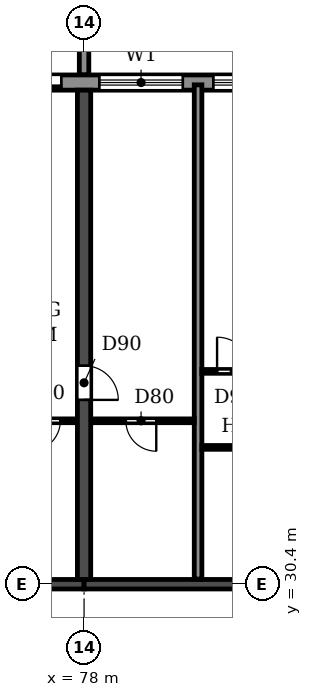
"""IFC4 building model, lengths in metres.
Left out: names, types, materials, properties, quantities, classifications, styles, units other than length and angle.
Written with IfcOpenShell. Run it as: python <this file> out.ifc"""

import sys

from ifc_helpers import new_model, si_unit, direction, frame, frame_2d, origin, place, context, subcontext, project, spatial, polyline, rectangle, outline, extrude, source, transform, mapped, element, fill, save


model = new_model("IFC4")
c1 = context("Model", 3, precision=1e-05, world=origin(), true_north=direction((0.0, 1.0)))
c2 = subcontext(c1, "Body", "Model", "MODEL_VIEW")
j1 = project(units=[si_unit("LENGTHUNIT", "METRE"), si_unit("PLANEANGLEUNIT", "RADIAN")], contexts=[c1])
p1 = place(None, origin())
s1 = spatial("IfcSite", under=j1, at=p1, CompositionType="ELEMENT")
p2 = place(p1, origin())
s2 = spatial("IfcBuilding", under=s1, at=p2, CompositionType="ELEMENT")
p3 = place(p2, frame((0.0, 0.0, 82.8)))
s3 = spatial("IfcBuildingStorey", under=s2, at=p3, CompositionType="ELEMENT", Elevation=82.8)
p4 = place(p3, frame((78.0, 30.525, 0.0), z_axis=(0.0, 0.0, 1.0), x_axis=(0.0, 1.0, 0.0)))
e1 = element("IfcWall", 1, at=p4, inside=s3, PredefinedType="SHEAR", context=c2, shape_type="SweptSolid", body=[
    extrude(rectangle(XDim=12.875, YDim=0.35, at=frame_2d((6.438, 0.0))), origin(), (0.0, 0.0, 1.0), 3.06),
])
p5 = place(p4, frame((4.725, 0.0, 0.0)))
e2 = element("IfcOpeningElement", 2, at=p5, cuts=e1, PredefinedType="OPENING", context=c2, shape_type="SweptSolid", body=[
    extrude(rectangle(XDim=0.9, YDim=2.1, at=frame_2d((0.45, 1.05))), frame((0.0, 0.185, 0.0), z_axis=(0.0, -1.0, 0.0), x_axis=(1.0, 0.0, 0.0)), (0.0, 0.0, 1.0), 0.37),
])
p6 = place(p3, frame((72.0, 30.4, 0.0), z_axis=(0.0, 0.0, 1.0), x_axis=(1.0, 0.0, 0.0)))
e3 = element("IfcWall", 3, at=p6, inside=s3, PredefinedType="SHEAR", context=c2, shape_type="SweptSolid", body=[
    extrude(rectangle(XDim=6.0, YDim=0.25, at=frame_2d((3.0, 0.0))), origin(), (0.0, 0.0, 1.0), 2.46),
])
p7 = place(p6, frame((2.55, 0.0, 0.0)))
e4 = element("IfcOpeningElement", 4, at=p7, cuts=e3, PredefinedType="OPENING", context=c2, shape_type="SweptSolid", body=[
    extrude(rectangle(XDim=1.0, YDim=2.1, at=frame_2d((0.5, 1.05))), frame((0.0, 0.135, 0.0), z_axis=(0.0, -1.0, 0.0), x_axis=(1.0, 0.0, 0.0)), (0.0, 0.0, 1.0), 0.27),
])
p8 = place(p3, frame((78.0, 30.4, 0.0), z_axis=(0.0, 0.0, 1.0), x_axis=(1.0, 0.0, 0.0)))
e5 = element("IfcWall", 5, at=p8, inside=s3, PredefinedType="SHEAR", context=c2, shape_type="SweptSolid", body=[
    extrude(rectangle(XDim=6.0, YDim=0.25, at=frame_2d((3.0, 0.0))), origin(), (0.0, 0.0, 1.0), 2.46),
])
p9 = place(p3, frame((91.317, 43.6, 0.0), z_axis=(0.0, 0.0, 1.0), x_axis=(-1.0, 0.0, 0.0)))
e6 = element("IfcWall", 6, at=p9, inside=s3, PredefinedType="STANDARD", context=c2, shape_type="SweptSolid", body=[
    extrude(rectangle(XDim=80.634, YDim=0.4, at=frame_2d((40.317, 0.0))), origin(), (0.0, 0.0, 1.0), 3.06),
])
p10 = place(p9, frame((76.717, 0.0, 0.9)))
e7 = element("IfcOpeningElement", 7, at=p10, cuts=e6, PredefinedType="OPENING", context=c2, shape_type="SweptSolid", body=[
    extrude(rectangle(XDim=2.2, YDim=1.5, at=frame_2d((1.1, 0.75))), frame((0.0, 0.21, 0.0), z_axis=(0.0, -1.0, 0.0), x_axis=(1.0, 0.0, 0.0)), (0.0, 0.0, 1.0), 0.42),
])
p11 = place(p9, frame((73.917, 0.0, 0.0)))
e8 = element("IfcOpeningElement", 8, at=p11, cuts=e6, PredefinedType="OPENING", context=c2, shape_type="SweptSolid", body=[
    extrude(rectangle(XDim=1.8, YDim=2.4, at=frame_2d((0.9, 1.2))), frame((0.0, 0.21, 0.0), z_axis=(0.0, -1.0, 0.0), x_axis=(1.0, 0.0, 0.0)), (0.0, 0.0, 1.0), 0.42),
])
p12 = place(p9, frame((70.717, 0.0, 0.9)))
e9 = element("IfcOpeningElement", 9, at=p12, cuts=e6, PredefinedType="OPENING", context=c2, shape_type="SweptSolid", body=[
    extrude(rectangle(XDim=2.2, YDim=1.5, at=frame_2d((1.1, 0.75))), frame((0.0, 0.21, 0.0), z_axis=(0.0, -1.0, 0.0), x_axis=(1.0, 0.0, 0.0)), (0.0, 0.0, 1.0), 0.42),
])
p13 = place(p9, frame((67.717, 0.0, 0.9)))
e10 = element("IfcOpeningElement", 10, at=p13, cuts=e6, PredefinedType="OPENING", context=c2, shape_type="SweptSolid", body=[
    extrude(rectangle(XDim=2.2, YDim=1.5, at=frame_2d((1.1, 0.75))), frame((0.0, 0.21, 0.0), z_axis=(0.0, -1.0, 0.0), x_axis=(1.0, 0.0, 0.0)), (0.0, 0.0, 1.0), 0.42),
])
p14 = place(p9, frame((64.717, 0.0, 0.9)))
e11 = element("IfcOpeningElement", 11, at=p14, cuts=e6, PredefinedType="OPENING", context=c2, shape_type="SweptSolid", body=[
    extrude(rectangle(XDim=2.2, YDim=1.5, at=frame_2d((1.1, 0.75))), frame((0.0, 0.21, 0.0), z_axis=(0.0, -1.0, 0.0), x_axis=(1.0, 0.0, 0.0)), (0.0, 0.0, 1.0), 0.42),
])
p15 = place(p9, frame((61.917, 0.0, 0.0)))
e12 = element("IfcOpeningElement", 12, at=p15, cuts=e6, PredefinedType="OPENING", context=c2, shape_type="SweptSolid", body=[
    extrude(rectangle(XDim=1.8, YDim=2.4, at=frame_2d((0.9, 1.2))), frame((0.0, 0.21, 0.0), z_axis=(0.0, -1.0, 0.0), x_axis=(1.0, 0.0, 0.0)), (0.0, 0.0, 1.0), 0.42),
])
p16 = place(p9, frame((58.917, 0.0, 0.0)))
e13 = element("IfcOpeningElement", 13, at=p16, cuts=e6, PredefinedType="OPENING", context=c2, shape_type="SweptSolid", body=[
    extrude(rectangle(XDim=1.8, YDim=2.4, at=frame_2d((0.9, 1.2))), frame((0.0, 0.21, 0.0), z_axis=(0.0, -1.0, 0.0), x_axis=(1.0, 0.0, 0.0)), (0.0, 0.0, 1.0), 0.42),
])
p17 = place(p9, frame((55.717, 0.0, 0.9)))
e14 = element("IfcOpeningElement", 14, at=p17, cuts=e6, PredefinedType="OPENING", context=c2, shape_type="SweptSolid", body=[
    extrude(rectangle(XDim=2.2, YDim=1.5, at=frame_2d((1.1, 0.75))), frame((0.0, 0.21, 0.0), z_axis=(0.0, -1.0, 0.0), x_axis=(1.0, 0.0, 0.0)), (0.0, 0.0, 1.0), 0.42),
])
p18 = place(p9, frame((52.717, 0.0, 0.9)))
e15 = element("IfcOpeningElement", 15, at=p18, cuts=e6, PredefinedType="OPENING", context=c2, shape_type="SweptSolid", body=[
    extrude(rectangle(XDim=2.2, YDim=1.5, at=frame_2d((1.1, 0.75))), frame((0.0, 0.21, 0.0), z_axis=(0.0, -1.0, 0.0), x_axis=(1.0, 0.0, 0.0)), (0.0, 0.0, 1.0), 0.42),
])
p19 = place(p9, frame((49.917, 0.0, 0.0)))
e16 = element("IfcOpeningElement", 16, at=p19, cuts=e6, PredefinedType="OPENING", context=c2, shape_type="SweptSolid", body=[
    extrude(rectangle(XDim=1.8, YDim=2.4, at=frame_2d((0.9, 1.2))), frame((0.0, 0.21, 0.0), z_axis=(0.0, -1.0, 0.0), x_axis=(1.0, 0.0, 0.0)), (0.0, 0.0, 1.0), 0.42),
])
p20 = place(p9, frame((46.717, 0.0, 0.9)))
e17 = element("IfcOpeningElement", 17, at=p20, cuts=e6, PredefinedType="OPENING", context=c2, shape_type="SweptSolid", body=[
    extrude(rectangle(XDim=2.2, YDim=1.5, at=frame_2d((1.1, 0.75))), frame((0.0, 0.21, 0.0), z_axis=(0.0, -1.0, 0.0), x_axis=(1.0, 0.0, 0.0)), (0.0, 0.0, 1.0), 0.42),
])
p21 = place(p9, frame((43.717, 0.0, 0.9)))
e18 = element("IfcOpeningElement", 18, at=p21, cuts=e6, PredefinedType="OPENING", context=c2, shape_type="SweptSolid", body=[
    extrude(rectangle(XDim=2.2, YDim=1.5, at=frame_2d((1.1, 0.75))), frame((0.0, 0.21, 0.0), z_axis=(0.0, -1.0, 0.0), x_axis=(1.0, 0.0, 0.0)), (0.0, 0.0, 1.0), 0.42),
])
p22 = place(p9, frame((40.717, 0.0, 0.9)))
e19 = element("IfcOpeningElement", 19, at=p22, cuts=e6, PredefinedType="OPENING", context=c2, shape_type="SweptSolid", body=[
    extrude(rectangle(XDim=2.2, YDim=1.5, at=frame_2d((1.1, 0.75))), frame((0.0, 0.21, 0.0), z_axis=(0.0, -1.0, 0.0), x_axis=(1.0, 0.0, 0.0)), (0.0, 0.0, 1.0), 0.42),
])
p23 = place(p9, frame((37.917, 0.0, 0.0)))
e20 = element("IfcOpeningElement", 20, at=p23, cuts=e6, PredefinedType="OPENING", context=c2, shape_type="SweptSolid", body=[
    extrude(rectangle(XDim=1.8, YDim=2.4, at=frame_2d((0.9, 1.2))), frame((0.0, 0.21, 0.0), z_axis=(0.0, -1.0, 0.0), x_axis=(1.0, 0.0, 0.0)), (0.0, 0.0, 1.0), 0.42),
])
p24 = place(p9, frame((34.717, 0.0, 0.9)))
e21 = element("IfcOpeningElement", 21, at=p24, cuts=e6, PredefinedType="OPENING", context=c2, shape_type="SweptSolid", body=[
    extrude(rectangle(XDim=2.2, YDim=1.5, at=frame_2d((1.1, 0.75))), frame((0.0, 0.21, 0.0), z_axis=(0.0, -1.0, 0.0), x_axis=(1.0, 0.0, 0.0)), (0.0, 0.0, 1.0), 0.42),
])
p25 = place(p9, frame((31.717, 0.0, 0.9)))
e22 = element("IfcOpeningElement", 22, at=p25, cuts=e6, PredefinedType="OPENING", context=c2, shape_type="SweptSolid", body=[
    extrude(rectangle(XDim=2.2, YDim=1.5, at=frame_2d((1.1, 0.75))), frame((0.0, 0.21, 0.0), z_axis=(0.0, -1.0, 0.0), x_axis=(1.0, 0.0, 0.0)), (0.0, 0.0, 1.0), 0.42),
])
p26 = place(p9, frame((28.917, 0.0, 0.0)))
e23 = element("IfcOpeningElement", 23, at=p26, cuts=e6, PredefinedType="OPENING", context=c2, shape_type="SweptSolid", body=[
    extrude(rectangle(XDim=1.8, YDim=2.4, at=frame_2d((0.9, 1.2))), frame((0.0, 0.21, 0.0), z_axis=(0.0, -1.0, 0.0), x_axis=(1.0, 0.0, 0.0)), (0.0, 0.0, 1.0), 0.42),
])
p27 = place(p9, frame((25.717, 0.0, 0.9)))
e24 = element("IfcOpeningElement", 24, at=p27, cuts=e6, PredefinedType="OPENING", context=c2, shape_type="SweptSolid", body=[
    extrude(rectangle(XDim=2.2, YDim=1.5, at=frame_2d((1.1, 0.75))), frame((0.0, 0.21, 0.0), z_axis=(0.0, -1.0, 0.0), x_axis=(1.0, 0.0, 0.0)), (0.0, 0.0, 1.0), 0.42),
])
p28 = place(p9, frame((22.717, 0.0, 0.9)))
e25 = element("IfcOpeningElement", 25, at=p28, cuts=e6, PredefinedType="OPENING", context=c2, shape_type="SweptSolid", body=[
    extrude(rectangle(XDim=2.2, YDim=1.5, at=frame_2d((1.1, 0.75))), frame((0.0, 0.21, 0.0), z_axis=(0.0, -1.0, 0.0), x_axis=(1.0, 0.0, 0.0)), (0.0, 0.0, 1.0), 0.42),
])
p29 = place(p9, frame((19.717, 0.0, 0.9)))
e26 = element("IfcOpeningElement", 26, at=p29, cuts=e6, PredefinedType="OPENING", context=c2, shape_type="SweptSolid", body=[
    extrude(rectangle(XDim=2.2, YDim=1.5, at=frame_2d((1.1, 0.75))), frame((0.0, 0.21, 0.0), z_axis=(0.0, -1.0, 0.0), x_axis=(1.0, 0.0, 0.0)), (0.0, 0.0, 1.0), 0.42),
])
p30 = place(p9, frame((16.717, 0.0, 0.9)))
e27 = element("IfcOpeningElement", 27, at=p30, cuts=e6, PredefinedType="OPENING", context=c2, shape_type="SweptSolid", body=[
    extrude(rectangle(XDim=2.2, YDim=1.5, at=frame_2d((1.1, 0.75))), frame((0.0, 0.21, 0.0), z_axis=(0.0, -1.0, 0.0), x_axis=(1.0, 0.0, 0.0)), (0.0, 0.0, 1.0), 0.42),
])
p31 = place(p9, frame((13.917, 0.0, 0.0)))
e28 = element("IfcOpeningElement", 28, at=p31, cuts=e6, PredefinedType="OPENING", context=c2, shape_type="SweptSolid", body=[
    extrude(rectangle(XDim=1.8, YDim=2.4, at=frame_2d((0.9, 1.2))), frame((0.0, 0.21, 0.0), z_axis=(0.0, -1.0, 0.0), x_axis=(1.0, 0.0, 0.0)), (0.0, 0.0, 1.0), 0.42),
])
p32 = place(p9, frame((10.717, 0.0, 0.9)))
e29 = element("IfcOpeningElement", 29, at=p32, cuts=e6, PredefinedType="OPENING", context=c2, shape_type="SweptSolid", body=[
    extrude(rectangle(XDim=2.2, YDim=1.5, at=frame_2d((1.1, 0.75))), frame((0.0, 0.21, 0.0), z_axis=(0.0, -1.0, 0.0), x_axis=(1.0, 0.0, 0.0)), (0.0, 0.0, 1.0), 0.42),
])
p33 = place(p9, frame((7.717, 0.0, 0.9)))
e30 = element("IfcOpeningElement", 30, at=p33, cuts=e6, PredefinedType="OPENING", context=c2, shape_type="SweptSolid", body=[
    extrude(rectangle(XDim=2.2, YDim=1.5, at=frame_2d((1.1, 0.75))), frame((0.0, 0.21, 0.0), z_axis=(0.0, -1.0, 0.0), x_axis=(1.0, 0.0, 0.0)), (0.0, 0.0, 1.0), 0.42),
])
p34 = place(p9, frame((4.917, 0.0, 0.0)))
e31 = element("IfcOpeningElement", 31, at=p34, cuts=e6, PredefinedType="OPENING", context=c2, shape_type="SweptSolid", body=[
    extrude(rectangle(XDim=1.8, YDim=2.4, at=frame_2d((0.9, 1.2))), frame((0.0, 0.21, 0.0), z_axis=(0.0, -1.0, 0.0), x_axis=(1.0, 0.0, 0.0)), (0.0, 0.0, 1.0), 0.42),
])
p35 = place(p9, frame((1.717, 0.0, 0.9)))
e32 = element("IfcOpeningElement", 32, at=p35, cuts=e6, PredefinedType="OPENING", context=c2, shape_type="SweptSolid", body=[
    extrude(rectangle(XDim=2.2, YDim=1.5, at=frame_2d((1.1, 0.75))), frame((0.0, 0.21, 0.0), z_axis=(0.0, -1.0, 0.0), x_axis=(1.0, 0.0, 0.0)), (0.0, 0.0, 1.0), 0.42),
])
m1 = source(origin(), c2, "Body", "SweptSolid", [
    extrude(outline(polyline([(0.0, 0.0), (0.25, 0.0), (0.25, 3.1), (0.0, 3.1), (0.0, 0.0)])), origin(), (0.0, 0.0, 1.0), 3.1),
])
p36 = place(p3, frame((77.875, 43.8, 0.0)))
e33 = element("IfcWall", 33, at=p36, inside=s3, PredefinedType="STANDARD", context=c2, shape_type="MappedRepresentation", body=[
    mapped(m1, transform((0.0, 0.0, 0.0))),
])
p37 = place(p3, frame((81.0, 30.535, 0.0), z_axis=(0.0, 0.0, 1.0), x_axis=(0.0, 1.0, 0.0)))
e34 = element("IfcWall", 34, at=p37, inside=s3, PredefinedType="PARTITIONING", context=c2, shape_type="SweptSolid", body=[
    extrude(rectangle(XDim=13.005, YDim=0.2, at=frame_2d((6.502, 0.0))), origin(), (0.0, 0.0, 1.0), 3.06),
])
p38 = place(p3, frame((81.1, 34.0, 0.0), z_axis=(0.0, 0.0, 1.0), x_axis=(1.0, 0.0, 0.0)))
e35 = element("IfcWall", 35, at=p38, inside=s3, PredefinedType="PARTITIONING", context=c2, shape_type="SweptSolid", body=[
    extrude(rectangle(XDim=2.715, YDim=0.1, at=frame_2d((1.357, 0.0))), origin(), (0.0, 0.0, 1.0), 3.06),
])
p39 = place(p38, frame((1.0, 0.0, 0.0)))
e36 = element("IfcOpeningElement", 36, at=p39, cuts=e35, PredefinedType="OPENING", context=c2, shape_type="SweptSolid", body=[
    extrude(rectangle(XDim=0.8, YDim=2.1, at=frame_2d((0.4, 1.05))), frame((0.0, 0.06, 0.0), z_axis=(0.0, -1.0, 0.0), x_axis=(1.0, 0.0, 0.0)), (0.0, 0.0, 1.0), 0.12),
])
p40 = place(p3, frame((75.9, 34.7, 0.0), z_axis=(0.0, 0.0, 1.0), x_axis=(1.0, 0.0, 0.0)))
e37 = element("IfcWall", 37, at=p40, inside=s3, PredefinedType="PARTITIONING", context=c2, shape_type="SweptSolid", body=[
    extrude(rectangle(XDim=1.915, YDim=0.1, at=frame_2d((0.958, 0.0))), origin(), (0.0, 0.0, 1.0), 3.06),
])
p41 = place(p40, frame((0.675, 0.0, 0.0)))
e38 = element("IfcOpeningElement", 38, at=p41, cuts=e37, PredefinedType="OPENING", context=c2, shape_type="SweptSolid", body=[
    extrude(rectangle(XDim=0.8, YDim=2.1, at=frame_2d((0.4, 1.05))), frame((0.0, 0.06, 0.0), z_axis=(0.0, -1.0, 0.0), x_axis=(1.0, 0.0, 0.0)), (0.0, 0.0, 1.0), 0.12),
])
p42 = place(p3, frame((78.185, 34.7, 0.0), z_axis=(0.0, 0.0, 1.0), x_axis=(1.0, 0.0, 0.0)))
e39 = element("IfcWall", 39, at=p42, inside=s3, PredefinedType="PARTITIONING", context=c2, shape_type="SweptSolid", body=[
    extrude(rectangle(XDim=2.715, YDim=0.1, at=frame_2d((1.357, 0.0))), origin(), (0.0, 0.0, 1.0), 3.06),
])
p43 = place(p42, frame((0.915, 0.0, 0.0)))
e40 = element("IfcOpeningElement", 40, at=p43, cuts=e39, PredefinedType="OPENING", context=c2, shape_type="SweptSolid", body=[
    extrude(rectangle(XDim=0.8, YDim=2.1, at=frame_2d((0.4, 1.05))), frame((0.0, 0.06, 0.0), z_axis=(0.0, -1.0, 0.0), x_axis=(1.0, 0.0, 0.0)), (0.0, 0.0, 1.0), 0.12),
])
p44 = place(p3, frame((81.1, 36.0, 0.0), z_axis=(0.0, 0.0, 1.0), x_axis=(1.0, 0.0, 0.0)))
e41 = element("IfcWall", 41, at=p44, inside=s3, PredefinedType="PARTITIONING", context=c2, shape_type="SweptSolid", body=[
    extrude(rectangle(XDim=2.715, YDim=0.1, at=frame_2d((1.357, 0.0))), origin(), (0.0, 0.0, 1.0), 3.06),
])
p45 = place(p44, frame((0.4, 0.0, 0.0)))
e42 = element("IfcOpeningElement", 42, at=p45, cuts=e41, PredefinedType="OPENING", context=c2, shape_type="SweptSolid", body=[
    extrude(rectangle(XDim=0.9, YDim=2.1, at=frame_2d((0.45, 1.05))), frame((0.0, 0.06, 0.0), z_axis=(0.0, -1.0, 0.0), x_axis=(1.0, 0.0, 0.0)), (0.0, 0.0, 1.0), 0.12),
])
p46 = place(p31, origin())
e43 = element("IfcDoor", 43, at=p46, inside=s3, OperationType="DOUBLE_DOOR_SLIDING", PredefinedType="DOOR", context=c2, shape_type="SweptSolid", body=[
    extrude(rectangle(XDim=1.8, YDim=2.4, at=frame_2d((0.9, 1.2))), frame((0.0, 0.025, 0.0), z_axis=(0.0, -1.0, 0.0), x_axis=(1.0, 0.0, 0.0)), (0.0, 0.0, 1.0), 0.05),
])
fill(e28, e43)
p47 = place(p32, origin())
e44 = element("IfcWindow", 44, at=p47, inside=s3, PartitioningType="DOUBLE_PANEL_HORIZONTAL", PredefinedType="WINDOW", context=c2, shape_type="SweptSolid", body=[
    extrude(rectangle(XDim=2.2, YDim=1.5, at=frame_2d((1.1, 0.75))), frame((0.0, 0.03, 0.0), z_axis=(0.0, -1.0, 0.0), x_axis=(1.0, 0.0, 0.0)), (0.0, 0.0, 1.0), 0.06),
])
fill(e29, e44)
p48 = place(p33, origin())
e45 = element("IfcWindow", 45, at=p48, inside=s3, PartitioningType="DOUBLE_PANEL_HORIZONTAL", PredefinedType="WINDOW", context=c2, shape_type="SweptSolid", body=[
    extrude(rectangle(XDim=2.2, YDim=1.5, at=frame_2d((1.1, 0.75))), frame((0.0, 0.03, 0.0), z_axis=(0.0, -1.0, 0.0), x_axis=(1.0, 0.0, 0.0)), (0.0, 0.0, 1.0), 0.06),
])
fill(e30, e45)
p49 = place(p43, frame((0.8, 0.0, 0.0), z_axis=(0.0, 0.0, 1.0), x_axis=(-1.0, 0.0, 0.0)))
e46 = element("IfcDoor", 46, at=p49, inside=s3, OperationType="SINGLE_SWING_LEFT", PredefinedType="DOOR", context=c2, shape_type="SweptSolid", body=[
    extrude(rectangle(XDim=0.8, YDim=2.1, at=frame_2d((0.4, 1.05))), frame((0.0, 0.025, 0.0), z_axis=(0.0, -1.0, 0.0), x_axis=(1.0, 0.0, 0.0)), (0.0, 0.0, 1.0), 0.05),
])
fill(e40, e46)
p50 = place(p41, frame((0.8, 0.0, 0.0), z_axis=(0.0, 0.0, 1.0), x_axis=(-1.0, 0.0, 0.0)))
e47 = element("IfcDoor", 47, at=p50, inside=s3, OperationType="SINGLE_SWING_RIGHT", PredefinedType="DOOR", context=c2, shape_type="SweptSolid", body=[
    extrude(rectangle(XDim=0.8, YDim=2.1, at=frame_2d((0.4, 1.05))), frame((0.0, 0.025, 0.0), z_axis=(0.0, -1.0, 0.0), x_axis=(1.0, 0.0, 0.0)), (0.0, 0.0, 1.0), 0.05),
])
fill(e38, e47)
p51 = place(p5, frame((0.9, 0.0, 0.0), z_axis=(0.0, 0.0, 1.0), x_axis=(-1.0, 0.0, 0.0)))
e48 = element("IfcDoor", 48, at=p51, inside=s3, OperationType="SINGLE_SWING_RIGHT", PredefinedType="DOOR", context=c2, shape_type="SweptSolid", body=[
    extrude(rectangle(XDim=0.9, YDim=2.1, at=frame_2d((0.45, 1.05))), frame((0.0, 0.025, 0.0), z_axis=(0.0, -1.0, 0.0), x_axis=(1.0, 0.0, 0.0)), (0.0, 0.0, 1.0), 0.05),
])
fill(e2, e48)
p52 = place(p45, origin())
e49 = element("IfcDoor", 49, at=p52, inside=s3, OperationType="SINGLE_SWING_LEFT", PredefinedType="DOOR", context=c2, shape_type="SweptSolid", body=[
    extrude(rectangle(XDim=0.9, YDim=2.1, at=frame_2d((0.45, 1.05))), frame((0.0, 0.025, 0.0), z_axis=(0.0, -1.0, 0.0), x_axis=(1.0, 0.0, 0.0)), (0.0, 0.0, 1.0), 0.05),
])
fill(e42, e49)
save(model, sys.argv[1])
